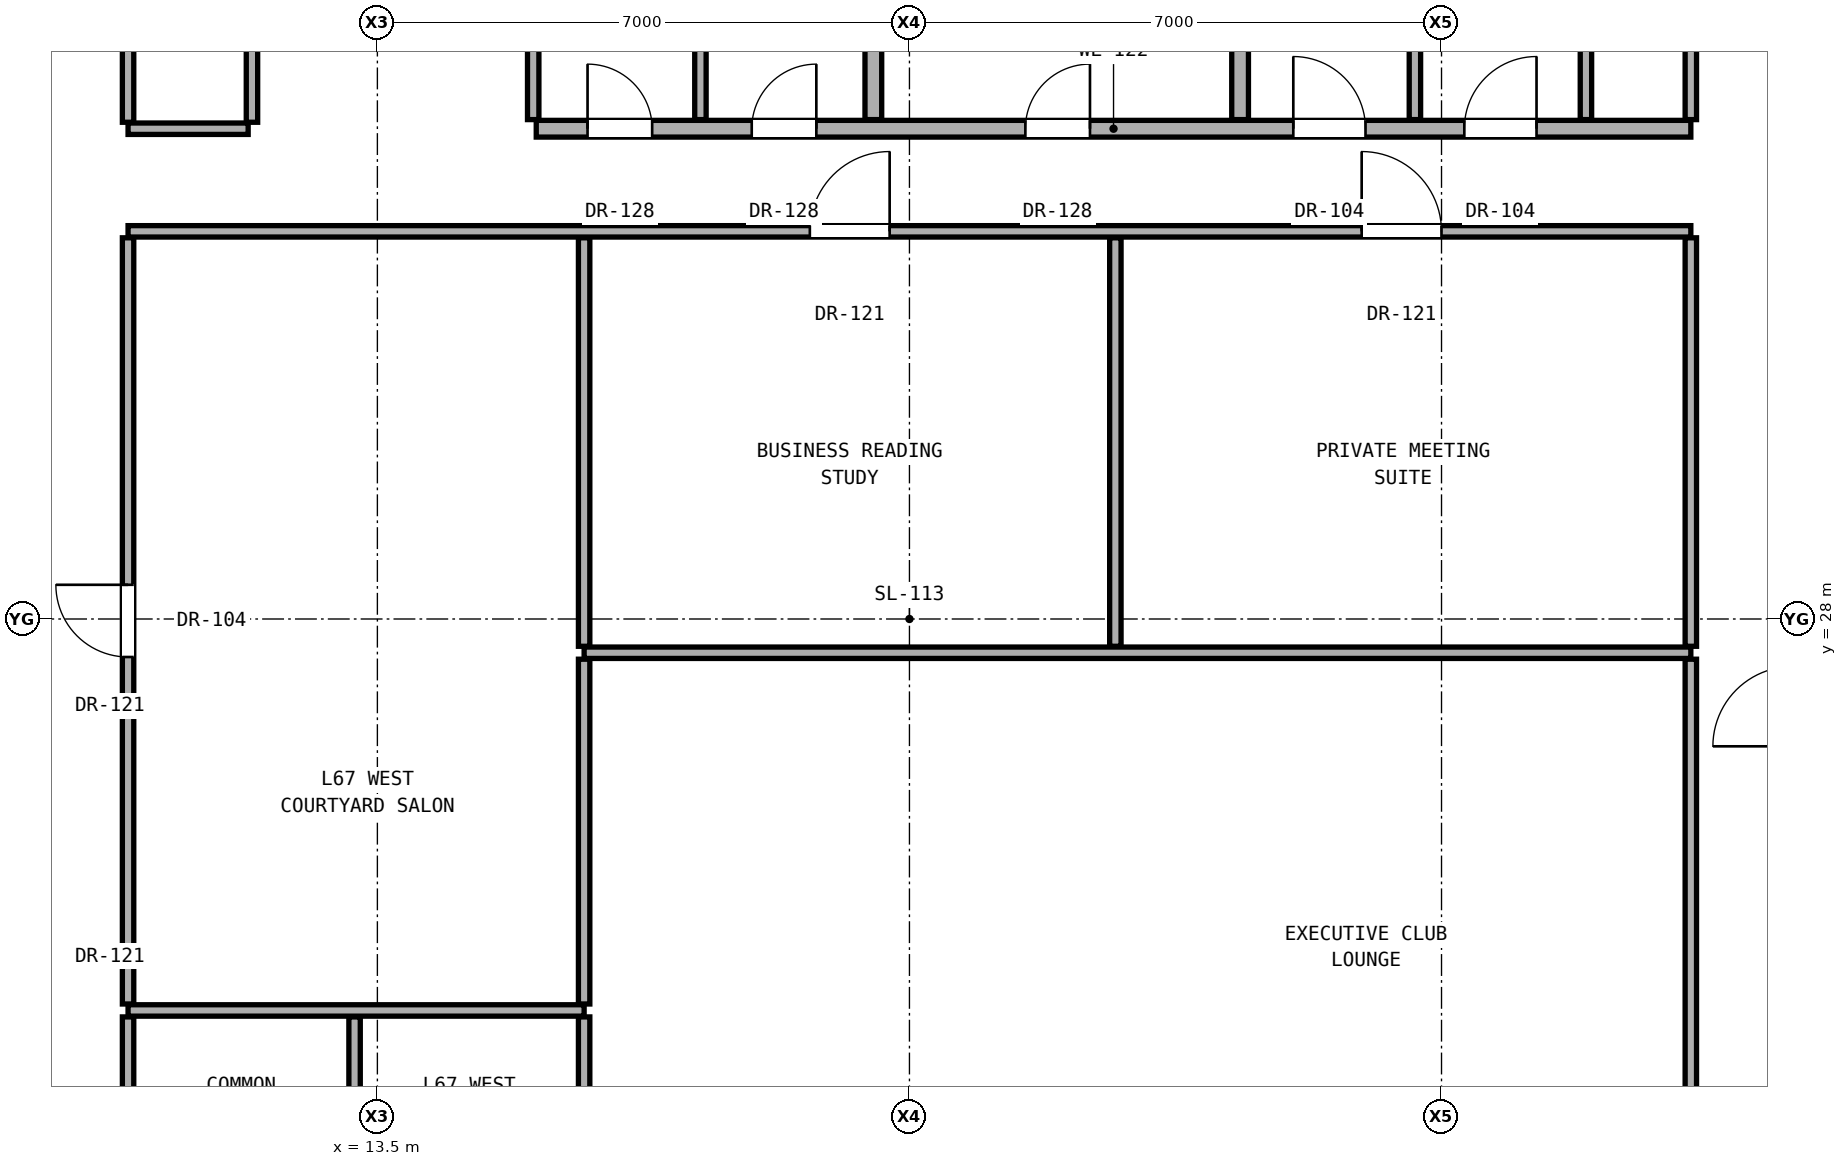
"""IFC4 building model, lengths in metres.
Left out: names, types, materials, properties, quantities, classifications, styles, units other than length and angle.
Written with IfcOpenShell. Run it as: python <this file> out.ifc"""

import sys

from ifc_helpers import new_model, si_unit, direction, frame, frame_2d, origin, place, context, subcontext, project, spatial, rectangle, extrude, element, fill, save


model = new_model("IFC4")
c1 = context("Model", 3, precision=1e-05, world=origin(), true_north=direction((0.0, 1.0)))
c2 = subcontext(c1, "Body", "Model", "MODEL_VIEW")
j1 = project(units=[si_unit("LENGTHUNIT", "METRE"), si_unit("PLANEANGLEUNIT", "RADIAN")], contexts=[c1])
p1 = place(None, origin())
s1 = spatial("IfcSite", under=j1, at=p1, CompositionType="ELEMENT")
p2 = place(p1, origin())
s2 = spatial("IfcBuilding", under=s1, at=p2, CompositionType="ELEMENT")
p3 = place(p2, frame((0.0, 0.0, 235.9)))
s3 = spatial("IfcBuildingStorey", under=s2, at=p3, CompositionType="ELEMENT", Elevation=235.9)
p4 = place(p3, frame((10.22, 22.85, 0.0), z_axis=(0.0, 0.0, 1.0), x_axis=(1.0, 0.0, 0.0)))
e1 = element("IfcWall", 1, at=p4, inside=s3, PredefinedType="PARTITIONING", context=c2, shape_type="SweptSolid", body=[
    extrude(rectangle(XDim=6.0, YDim=0.15, at=frame_2d((3.0, 0.0))), origin(), (0.0, 0.0, 1.0), 2.236),
])
p5 = place(p3, frame((16.22, 27.556, 0.0), z_axis=(0.0, 0.0, 1.0), x_axis=(1.0, 0.0, 0.0)))
e2 = element("IfcWall", 2, at=p5, inside=s3, PredefinedType="PARTITIONING", context=c2, shape_type="SweptSolid", body=[
    extrude(rectangle(XDim=14.56, YDim=0.15, at=frame_2d((7.28, 0.0))), origin(), (0.0, 0.0, 1.0), 2.236),
])
p6 = place(p3, frame((10.22, 33.1, 0.0), z_axis=(0.0, 0.0, 1.0), x_axis=(1.0, 0.0, 0.0)))
e3 = element("IfcWall", 3, at=p6, inside=s3, PredefinedType="PARTITIONING", context=c2, shape_type="SweptSolid", body=[
    extrude(rectangle(XDim=20.56, YDim=0.15, at=frame_2d((10.28, 0.0))), origin(), (0.0, 0.0, 1.0), 2.236),
])
p7 = place(p6, frame((8.969, 0.0, 0.0)))
e4 = element("IfcOpeningElement", 4, at=p7, cuts=e3, PredefinedType="OPENING", context=c2, shape_type="SweptSolid", body=[
    extrude(rectangle(XDim=1.05, YDim=2.2, at=frame_2d((0.525, 1.1))), frame((0.0, 0.085, 0.0), z_axis=(0.0, -1.0, 0.0), x_axis=(1.0, 0.0, 0.0)), (0.0, 0.0, 1.0), 0.17),
])
p8 = place(p6, frame((16.229, 0.0, 0.0)))
e5 = element("IfcOpeningElement", 5, at=p8, cuts=e3, PredefinedType="OPENING", context=c2, shape_type="SweptSolid", body=[
    extrude(rectangle(XDim=1.05, YDim=2.2, at=frame_2d((0.525, 1.1))), frame((0.0, 0.085, 0.0), z_axis=(0.0, -1.0, 0.0), x_axis=(1.0, 0.0, 0.0)), (0.0, 0.0, 1.0), 0.17),
])
p9 = place(p3, frame((10.22, 34.45, 0.0), z_axis=(0.0, 0.0, 1.0), x_axis=(1.0, 0.0, 0.0)))
e6 = element("IfcWall", 6, at=p9, inside=s3, PredefinedType="PARTITIONING", context=c2, shape_type="SweptSolid", body=[
    extrude(rectangle(XDim=1.58, YDim=0.15, at=frame_2d((0.79, 0.0))), origin(), (0.0, 0.0, 1.0), 2.236),
])
p10 = place(p3, frame((15.59, 34.45, 0.0), z_axis=(0.0, 0.0, 1.0), x_axis=(1.0, 0.0, 0.0)))
e7 = element("IfcWall", 7, at=p10, inside=s3, PredefinedType="SOLIDWALL", context=c2, shape_type="SweptSolid", body=[
    extrude(rectangle(XDim=15.19, YDim=0.22, at=frame_2d((7.595, 0.0))), origin(), (0.0, 0.0, 1.0), 2.236),
])
p11 = place(p10, frame((6.435, 0.0, 0.0)))
e8 = element("IfcOpeningElement", 8, at=p11, cuts=e7, PredefinedType="OPENING", context=c2, shape_type="SweptSolid", body=[
    extrude(rectangle(XDim=0.85, YDim=2.01, at=frame_2d((0.425, 1.005))), frame((0.0, 0.12, 0.0), z_axis=(0.0, -1.0, 0.0), x_axis=(1.0, 0.0, 0.0)), (0.0, 0.0, 1.0), 0.24),
])
p12 = place(p10, frame((9.96, 0.0, 0.0)))
e9 = element("IfcOpeningElement", 9, at=p12, cuts=e7, PredefinedType="OPENING", context=c2, shape_type="SweptSolid", body=[
    extrude(rectangle(XDim=0.95, YDim=2.15, at=frame_2d((0.475, 1.075))), frame((0.0, 0.12, 0.0), z_axis=(0.0, -1.0, 0.0), x_axis=(1.0, 0.0, 0.0)), (0.0, 0.0, 1.0), 0.24),
])
p13 = place(p10, frame((12.21, 0.0, 0.0)))
e10 = element("IfcOpeningElement", 10, at=p13, cuts=e7, PredefinedType="OPENING", context=c2, shape_type="SweptSolid", body=[
    extrude(rectangle(XDim=0.95, YDim=2.15, at=frame_2d((0.475, 1.075))), frame((0.0, 0.12, 0.0), z_axis=(0.0, -1.0, 0.0), x_axis=(1.0, 0.0, 0.0)), (0.0, 0.0, 1.0), 0.24),
])
p14 = place(p10, frame((0.675, 0.0, 0.0)))
e11 = element("IfcOpeningElement", 11, at=p14, cuts=e7, PredefinedType="OPENING", context=c2, shape_type="SweptSolid", body=[
    extrude(rectangle(XDim=0.85, YDim=2.01, at=frame_2d((0.425, 1.005))), frame((0.0, 0.12, 0.0), z_axis=(0.0, -1.0, 0.0), x_axis=(1.0, 0.0, 0.0)), (0.0, 0.0, 1.0), 0.24),
])
p15 = place(p10, frame((2.835, 0.0, 0.0)))
e12 = element("IfcOpeningElement", 12, at=p15, cuts=e7, PredefinedType="OPENING", context=c2, shape_type="SweptSolid", body=[
    extrude(rectangle(XDim=0.85, YDim=2.01, at=frame_2d((0.425, 1.005))), frame((0.0, 0.12, 0.0), z_axis=(0.0, -1.0, 0.0), x_axis=(1.0, 0.0, 0.0)), (0.0, 0.0, 1.0), 0.24),
])
p16 = place(p3, frame((10.22, 19.985, 0.0), z_axis=(0.0, 0.0, 1.0), x_axis=(0.0, 1.0, 0.0)))
e13 = element("IfcWall", 13, at=p16, inside=s3, PredefinedType="PARTITIONING", context=c2, shape_type="SweptSolid", body=[
    extrude(rectangle(XDim=2.78, YDim=0.15, at=frame_2d((1.39, 0.0))), origin(), (0.0, 0.0, 1.0), 3.1),
])
p17 = place(p3, frame((10.22, 22.935, 0.0), z_axis=(0.0, 0.0, 1.0), x_axis=(0.0, 1.0, 0.0)))
e14 = element("IfcWall", 14, at=p17, inside=s3, PredefinedType="PARTITIONING", context=c2, shape_type="SweptSolid", body=[
    extrude(rectangle(XDim=10.08, YDim=0.15, at=frame_2d((5.04, 0.0))), origin(), (0.0, 0.0, 1.0), 2.396),
])
p18 = place(p17, frame((4.565, 0.0, 0.0)))
e15 = element("IfcOpeningElement", 15, at=p18, cuts=e14, PredefinedType="OPENING", context=c2, shape_type="SweptSolid", body=[
    extrude(rectangle(XDim=0.95, YDim=2.15, at=frame_2d((0.475, 1.075))), frame((0.0, 0.085, 0.0), z_axis=(0.0, -1.0, 0.0), x_axis=(1.0, 0.0, 0.0)), (0.0, 0.0, 1.0), 0.17),
])
p19 = place(p3, frame((10.22, 34.535, 0.0), z_axis=(0.0, 0.0, 1.0), x_axis=(0.0, 1.0, 0.0)))
e16 = element("IfcWall", 16, at=p19, inside=s3, PredefinedType="PARTITIONING", context=c2, shape_type="SweptSolid", body=[
    extrude(rectangle(XDim=9.13, YDim=0.15, at=frame_2d((4.565, 0.0))), origin(), (0.0, 0.0, 1.0), 2.492),
])
p20 = place(p3, frame((11.85, 34.535, 0.0), z_axis=(0.0, 0.0, 1.0), x_axis=(0.0, 1.0, 0.0)))
e17 = element("IfcWall", 17, at=p20, inside=s3, PredefinedType="PARTITIONING", context=c2, shape_type="SweptSolid", body=[
    extrude(rectangle(XDim=2.845, YDim=0.15, at=frame_2d((1.422, 0.0))), origin(), (0.0, 0.0, 1.0), 3.1),
])
p21 = place(p3, frame((13.2, 19.985, 0.0), z_axis=(0.0, 0.0, 1.0), x_axis=(0.0, 1.0, 0.0)))
e18 = element("IfcWall", 18, at=p21, inside=s3, PredefinedType="PARTITIONING", context=c2, shape_type="SweptSolid", body=[
    extrude(rectangle(XDim=2.78, YDim=0.15, at=frame_2d((1.39, 0.0))), origin(), (0.0, 0.0, 1.0), 3.1),
])
p22 = place(p3, frame((15.55, 34.57, 0.0), z_axis=(0.0, 0.0, 1.0), x_axis=(0.0, 1.0, 0.0)))
e19 = element("IfcWall", 19, at=p22, inside=s3, PredefinedType="PARTITIONING", context=c2, shape_type="SweptSolid", body=[
    extrude(rectangle(XDim=2.81, YDim=0.15, at=frame_2d((1.405, 0.0))), origin(), (0.0, 0.0, 1.0), 3.1),
])
p23 = place(p3, frame((16.22, 19.985, 0.0), z_axis=(0.0, 0.0, 1.0), x_axis=(0.0, 1.0, 0.0)))
e20 = element("IfcWall", 20, at=p23, inside=s3, PredefinedType="PARTITIONING", context=c2, shape_type="SweptSolid", body=[
    extrude(rectangle(XDim=2.78, YDim=0.15, at=frame_2d((1.39, 0.0))), origin(), (0.0, 0.0, 1.0), 3.1),
])
p24 = place(p3, frame((16.22, 22.935, 0.0), z_axis=(0.0, 0.0, 1.0), x_axis=(0.0, 1.0, 0.0)))
e21 = element("IfcWall", 21, at=p24, inside=s3, PredefinedType="PARTITIONING", context=c2, shape_type="SweptSolid", body=[
    extrude(rectangle(XDim=4.536, YDim=0.15, at=frame_2d((2.268, 0.0))), origin(), (0.0, 0.0, 1.0), 2.236),
])
p25 = place(p3, frame((16.22, 27.641, 0.0), z_axis=(0.0, 0.0, 1.0), x_axis=(0.0, 1.0, 0.0)))
e22 = element("IfcWall", 22, at=p25, inside=s3, PredefinedType="PARTITIONING", context=c2, shape_type="SweptSolid", body=[
    extrude(rectangle(XDim=5.374, YDim=0.15, at=frame_2d((2.687, 0.0))), origin(), (0.0, 0.0, 1.0), 2.236),
])
p26 = place(p3, frame((17.75, 34.57, 0.0), z_axis=(0.0, 0.0, 1.0), x_axis=(0.0, 1.0, 0.0)))
e23 = element("IfcWall", 23, at=p26, inside=s3, PredefinedType="PARTITIONING", context=c2, shape_type="SweptSolid", body=[
    extrude(rectangle(XDim=2.81, YDim=0.15, at=frame_2d((1.405, 0.0))), origin(), (0.0, 0.0, 1.0), 3.1),
])
p27 = place(p3, frame((20.025, 34.57, 0.0), z_axis=(0.0, 0.0, 1.0), x_axis=(0.0, 1.0, 0.0)))
e24 = element("IfcWall", 24, at=p27, inside=s3, PredefinedType="SOLIDWALL", context=c2, shape_type="SweptSolid", body=[
    extrude(rectangle(XDim=2.81, YDim=0.22, at=frame_2d((1.405, 0.0))), origin(), (0.0, 0.0, 1.0), 3.1),
])
p28 = place(p3, frame((23.209, 27.641, 0.0), z_axis=(0.0, 0.0, 1.0), x_axis=(0.0, 1.0, 0.0)))
e25 = element("IfcWall", 25, at=p28, inside=s3, PredefinedType="PARTITIONING", context=c2, shape_type="SweptSolid", body=[
    extrude(rectangle(XDim=5.374, YDim=0.15, at=frame_2d((2.687, 0.0))), origin(), (0.0, 0.0, 1.0), 2.236),
])
p29 = place(p3, frame((24.85, 34.57, 0.0), z_axis=(0.0, 0.0, 1.0), x_axis=(0.0, 1.0, 0.0)))
e26 = element("IfcWall", 26, at=p29, inside=s3, PredefinedType="SOLIDWALL", context=c2, shape_type="SweptSolid", body=[
    extrude(rectangle(XDim=2.81, YDim=0.22, at=frame_2d((1.405, 0.0))), origin(), (0.0, 0.0, 1.0), 3.1),
])
for number, where, z_axis, x_axis in (
    (27, (27.15, 34.57, 0.0), (0.0, 0.0, 1.0), (0.0, 1.0, 0.0)),
    (28, (29.4, 34.57, 0.0), (0.0, 0.0, 1.0), (0.0, 1.0, 0.0)),
):
    element("IfcWall", number, at=place(p3, frame(where, z_axis=z_axis, x_axis=x_axis)), inside=s3, PredefinedType="PARTITIONING", context=c2, shape_type="SweptSolid", body=[
        extrude(rectangle(XDim=2.81, YDim=0.15, at=frame_2d((1.405, 0.0))), origin(), (0.0, 0.0, 1.0), 3.1),
    ])
p30 = place(p3, frame((30.78, 19.985, 0.0), z_axis=(0.0, 0.0, 1.0), x_axis=(0.0, 1.0, 0.0)))
e29 = element("IfcWall", 29, at=p30, inside=s3, PredefinedType="PARTITIONING", context=c2, shape_type="SweptSolid", body=[
    extrude(rectangle(XDim=7.486, YDim=0.15, at=frame_2d((3.743, 0.0))), origin(), (0.0, 0.0, 1.0), 2.396),
])
p31 = place(p3, frame((30.78, 27.641, 0.0), z_axis=(0.0, 0.0, 1.0), x_axis=(0.0, 1.0, 0.0)))
e30 = element("IfcWall", 30, at=p31, inside=s3, PredefinedType="PARTITIONING", context=c2, shape_type="SweptSolid", body=[
    extrude(rectangle(XDim=5.374, YDim=0.15, at=frame_2d((2.687, 0.0))), origin(), (0.0, 0.0, 1.0), 2.396),
])
p32 = place(p3, frame((30.78, 34.57, 0.0), z_axis=(0.0, 0.0, 1.0), x_axis=(0.0, 1.0, 0.0)))
e31 = element("IfcWall", 31, at=p32, inside=s3, PredefinedType="PARTITIONING", context=c2, shape_type="SweptSolid", body=[
    extrude(rectangle(XDim=9.095, YDim=0.15, at=frame_2d((4.547, 0.0))), origin(), (0.0, 0.0, 1.0), 2.492),
])
p33 = place(p11, origin())
e32 = element("IfcDoor", 32, at=p33, inside=s3, OperationType="SINGLE_SWING_RIGHT", PredefinedType="DOOR", context=c2, shape_type="SweptSolid", body=[
    extrude(rectangle(XDim=0.85, YDim=2.01, at=frame_2d((0.425, 1.005))), frame((0.0, 0.025, 0.0), z_axis=(0.0, -1.0, 0.0), x_axis=(1.0, 0.0, 0.0)), (0.0, 0.0, 1.0), 0.05),
])
fill(e8, e32)
p34 = place(p12, origin())
e33 = element("IfcDoor", 33, at=p34, inside=s3, OperationType="SINGLE_SWING_LEFT", PredefinedType="DOOR", context=c2, shape_type="SweptSolid", body=[
    extrude(rectangle(XDim=0.95, YDim=2.15, at=frame_2d((0.475, 1.075))), frame((0.0, 0.025, 0.0), z_axis=(0.0, -1.0, 0.0), x_axis=(1.0, 0.0, 0.0)), (0.0, 0.0, 1.0), 0.05),
])
fill(e9, e33)
p35 = place(p13, origin())
e34 = element("IfcDoor", 34, at=p35, inside=s3, OperationType="SINGLE_SWING_RIGHT", PredefinedType="DOOR", context=c2, shape_type="SweptSolid", body=[
    extrude(rectangle(XDim=0.95, YDim=2.15, at=frame_2d((0.475, 1.075))), frame((0.0, 0.025, 0.0), z_axis=(0.0, -1.0, 0.0), x_axis=(1.0, 0.0, 0.0)), (0.0, 0.0, 1.0), 0.05),
])
fill(e10, e34)
p36 = place(p14, origin())
e35 = element("IfcDoor", 35, at=p36, inside=s3, OperationType="SINGLE_SWING_LEFT", PredefinedType="DOOR", context=c2, shape_type="SweptSolid", body=[
    extrude(rectangle(XDim=0.85, YDim=2.01, at=frame_2d((0.425, 1.005))), frame((0.0, 0.025, 0.0), z_axis=(0.0, -1.0, 0.0), x_axis=(1.0, 0.0, 0.0)), (0.0, 0.0, 1.0), 0.05),
])
fill(e11, e35)
p37 = place(p15, origin())
e36 = element("IfcDoor", 36, at=p37, inside=s3, OperationType="SINGLE_SWING_RIGHT", PredefinedType="DOOR", context=c2, shape_type="SweptSolid", body=[
    extrude(rectangle(XDim=0.85, YDim=2.01, at=frame_2d((0.425, 1.005))), frame((0.0, 0.025, 0.0), z_axis=(0.0, -1.0, 0.0), x_axis=(1.0, 0.0, 0.0)), (0.0, 0.0, 1.0), 0.05),
])
fill(e12, e36)
p38 = place(p18, origin())
e37 = element("IfcDoor", 37, at=p38, inside=s3, OperationType="SINGLE_SWING_RIGHT", PredefinedType="DOOR", context=c2, shape_type="SweptSolid", body=[
    extrude(rectangle(XDim=0.95, YDim=2.15, at=frame_2d((0.475, 1.075))), frame((0.0, 0.025, 0.0), z_axis=(0.0, -1.0, 0.0), x_axis=(1.0, 0.0, 0.0)), (0.0, 0.0, 1.0), 0.05),
])
fill(e15, e37)
p39 = place(p7, origin())
e38 = element("IfcDoor", 38, at=p39, inside=s3, OperationType="SINGLE_SWING_RIGHT", PredefinedType="DOOR", context=c2, shape_type="SweptSolid", body=[
    extrude(rectangle(XDim=1.05, YDim=2.2, at=frame_2d((0.525, 1.1))), frame((0.0, 0.025, 0.0), z_axis=(0.0, -1.0, 0.0), x_axis=(1.0, 0.0, 0.0)), (0.0, 0.0, 1.0), 0.05),
])
fill(e4, e38)
p40 = place(p8, origin())
e39 = element("IfcDoor", 39, at=p40, inside=s3, OperationType="SINGLE_SWING_LEFT", PredefinedType="DOOR", context=c2, shape_type="SweptSolid", body=[
    extrude(rectangle(XDim=1.05, YDim=2.2, at=frame_2d((0.525, 1.1))), frame((0.0, 0.025, 0.0), z_axis=(0.0, -1.0, 0.0), x_axis=(1.0, 0.0, 0.0)), (0.0, 0.0, 1.0), 0.05),
])
fill(e5, e39)
save(model, sys.argv[1])
